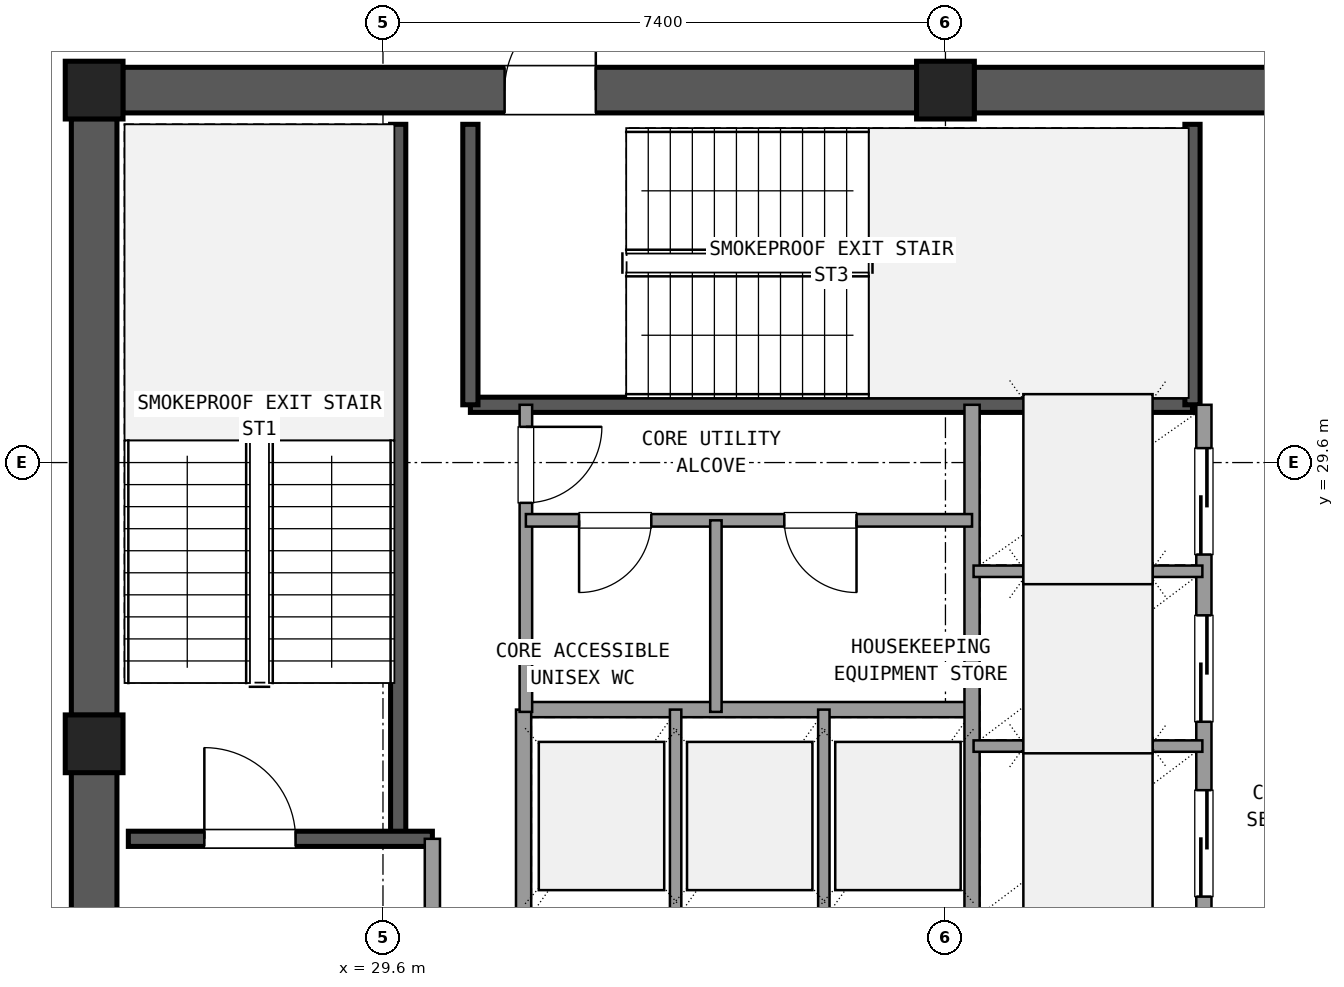
"""IFC4 building model, lengths in metres.
Left out: names, types, materials, properties, quantities, classifications, styles, units other than length and angle.
Written with IfcOpenShell. Run it as: python <this file> out.ifc"""

import sys

from ifc_helpers import new_model, si_unit, direction, frame, frame_2d, origin, origin_2d, place, context, subcontext, project, spatial, rectangle, extrude, element, fill, save


model = new_model("IFC4")
c1 = context("Model", 3, precision=1e-05, world=origin(), true_north=direction((0.0, 1.0)))
c2 = subcontext(c1, "Body", "Model", "MODEL_VIEW")
j1 = project(units=[si_unit("LENGTHUNIT", "METRE"), si_unit("PLANEANGLEUNIT", "RADIAN")], contexts=[c1])
p1 = place(None, origin())
s1 = spatial("IfcSite", under=j1, at=p1, CompositionType="ELEMENT")
p2 = place(p1, origin())
s2 = spatial("IfcBuilding", under=s1, at=p2, CompositionType="ELEMENT")
p3 = place(p2, frame((0.0, 0.0, 290.34)))
s3 = spatial("IfcBuildingStorey", under=s2, at=p3, CompositionType="ELEMENT", Elevation=290.34)
for number, where, z_axis, x_axis in (
    (1, (37.0, 34.5, 0.0), (0.0, 0.0, 1.0), (1.0, 0.0, 0.0)),
    (2, (25.8, 34.5, 0.0), (0.0, 0.0, 1.0), (1.0, 0.0, 0.0)),
    (3, (25.8, 25.9, 0.0), (0.0, 0.0, 1.0), (1.0, 0.0, 0.0)),
):
    element("IfcColumn", number, at=place(p3, frame(where, z_axis=z_axis, x_axis=x_axis)), inside=s3, PredefinedType="COLUMN", context=c2, shape_type="SweptSolid", body=[
        extrude(rectangle(XDim=0.76, YDim=0.76, at=origin_2d()), origin(), (0.0, 0.0, 1.0), 4.32),
    ])
p4 = place(p3, frame((47.825, 34.5, 0.0), z_axis=(0.0, 0.0, 1.0), x_axis=(-1.0, 0.0, 0.0)))
e4 = element("IfcWall", 4, at=p4, inside=s3, PredefinedType="SHEAR", context=c2, shape_type="SweptSolid", body=[
    extrude(rectangle(XDim=10.45, YDim=0.6, at=frame_2d((5.225, 0.0))), origin(), (0.0, 0.0, 1.0), 4.02),
])
p5 = place(p4, frame((4.725, 0.0, 0.0)))
e5 = element("IfcOpeningElement", 5, at=p5, cuts=e4, PredefinedType="OPENING", context=c2, shape_type="SweptSolid", body=[
    extrude(rectangle(XDim=1.6, YDim=2.2, at=frame_2d((0.8, 1.1))), frame((0.0, 0.31, 0.0), z_axis=(0.0, -1.0, 0.0), x_axis=(1.0, 0.0, 0.0)), (0.0, 0.0, 1.0), 0.62),
])
p6 = place(p3, frame((36.625, 34.5, 0.0), z_axis=(0.0, 0.0, 1.0), x_axis=(-1.0, 0.0, 0.0)))
e6 = element("IfcWall", 6, at=p6, inside=s3, PredefinedType="SHEAR", context=c2, shape_type="SweptSolid", body=[
    extrude(rectangle(XDim=10.45, YDim=0.6, at=frame_2d((5.225, 0.0))), origin(), (0.0, 0.0, 1.0), 4.02),
])
p7 = place(p6, frame((4.225, 0.0, 0.0)))
e7 = element("IfcOpeningElement", 7, at=p7, cuts=e6, PredefinedType="OPENING", context=c2, shape_type="SweptSolid", body=[
    extrude(rectangle(XDim=1.2, YDim=2.15, at=frame_2d((0.6, 1.075))), frame((0.0, 0.31, 0.0), z_axis=(0.0, -1.0, 0.0), x_axis=(1.0, 0.0, 0.0)), (0.0, 0.0, 1.0), 0.62),
])
p8 = place(p3, frame((25.8, 34.125, 0.0), z_axis=(0.0, 0.0, 1.0), x_axis=(0.0, -1.0, 0.0)))
e8 = element("IfcWall", 8, at=p8, inside=s3, PredefinedType="SHEAR", context=c2, shape_type="SweptSolid", body=[
    extrude(rectangle(XDim=7.85, YDim=0.6, at=frame_2d((3.925, 0.0))), origin(), (0.0, 0.0, 1.0), 4.02),
])
p9 = place(p3, frame((25.8, 25.525, 0.0), z_axis=(0.0, 0.0, 1.0), x_axis=(0.0, -1.0, 0.0)))
e9 = element("IfcWall", 9, at=p9, inside=s3, PredefinedType="SHEAR", context=c2, shape_type="SweptSolid", body=[
    extrude(rectangle(XDim=7.85, YDim=0.6, at=frame_2d((3.925, 0.0))), origin(), (0.0, 0.0, 1.0), 4.02),
])
p10 = place(p9, frame((2.275, 0.0, 0.0)))
e10 = element("IfcOpeningElement", 10, at=p10, cuts=e9, PredefinedType="OPENING", context=c2, shape_type="SweptSolid", body=[
    extrude(rectangle(XDim=1.2, YDim=2.15, at=frame_2d((0.6, 1.075))), frame((0.0, 0.31, 0.0), z_axis=(0.0, -1.0, 0.0), x_axis=(1.0, 0.0, 0.0)), (0.0, 0.0, 1.0), 0.62),
])
p11 = place(p3, frame((29.8, 24.65, 0.0), z_axis=(0.0, 0.0, 1.0), x_axis=(0.0, 1.0, 0.0)))
e11 = element("IfcWall", 11, at=p11, inside=s3, PredefinedType="SHEAR", context=c2, shape_type="SweptSolid", body=[
    extrude(rectangle(XDim=9.4, YDim=0.2, at=frame_2d((4.7, 0.0))), origin(), (0.0, 0.0, 1.0), 4.02),
])
p12 = place(p3, frame((26.25, 24.65, 0.0), z_axis=(0.0, 0.0, 1.0), x_axis=(1.0, 0.0, 0.0)))
e12 = element("IfcWall", 12, at=p12, inside=s3, PredefinedType="SHEAR", context=c2, shape_type="SweptSolid", body=[
    extrude(rectangle(XDim=4.0, YDim=0.2, at=frame_2d((2.0, 0.0))), origin(), (0.0, 0.0, 1.0), 4.02),
])
p13 = place(p12, frame((1.0, 0.0, 0.0)))
e13 = element("IfcOpeningElement", 13, at=p13, cuts=e12, PredefinedType="OPENING", context=c2, shape_type="SweptSolid", body=[
    extrude(rectangle(XDim=1.2, YDim=2.15, at=frame_2d((0.6, 1.075))), frame((0.0, 0.11, 0.0), z_axis=(0.0, -1.0, 0.0), x_axis=(1.0, 0.0, 0.0)), (0.0, 0.0, 1.0), 0.22),
])
p14 = place(p3, frame((30.75, 30.36, 0.0), z_axis=(0.0, 0.0, 1.0), x_axis=(1.0, 0.0, 0.0)))
e14 = element("IfcWall", 14, at=p14, inside=s3, PredefinedType="SHEAR", context=c2, shape_type="SweptSolid", body=[
    extrude(rectangle(XDim=9.5, YDim=0.2, at=frame_2d((4.75, 0.0))), origin(), (0.0, 0.0, 1.0), 4.02),
])
for number, where, z_axis, x_axis in (
    (15, (30.75, 30.36, 0.0), (0.0, 0.0, 1.0), (0.0, 1.0, 0.0)),
    (16, (40.25, 30.36, 0.0), (0.0, 0.0, 1.0), (0.0, 1.0, 0.0)),
):
    element("IfcWall", number, at=place(p3, frame(where, z_axis=z_axis, x_axis=x_axis)), inside=s3, PredefinedType="SHEAR", context=c2, shape_type="SweptSolid", body=[
        extrude(rectangle(XDim=3.69, YDim=0.2, at=frame_2d((1.845, 0.0))), origin(), (0.0, 0.0, 1.0), 4.02),
    ])
p15 = place(p3, frame((30.25, 17.75, 0.0), z_axis=(0.0, 0.0, 1.0), x_axis=(0.0, 1.0, 0.0)))
e17 = element("IfcWall", 17, at=p15, inside=s3, PredefinedType="SOLIDWALL", context=c2, shape_type="SweptSolid", body=[
    extrude(rectangle(XDim=6.9, YDim=0.2, at=frame_2d((3.45, 0.0))), origin(), (0.0, 0.0, 1.0), 2.93),
])
p16 = place(p15, frame((4.15, 0.0, 0.0)))
e18 = element("IfcOpeningElement", 18, at=p16, cuts=e17, PredefinedType="OPENING", context=c2, shape_type="SweptSolid", body=[
    extrude(rectangle(XDim=1.2, YDim=2.15, at=frame_2d((0.6, 1.075))), frame((0.0, 0.11, 0.0), z_axis=(0.0, -1.0, 0.0), x_axis=(1.0, 0.0, 0.0)), (0.0, 0.0, 1.0), 0.22),
])
p17 = place(p3, frame((31.45, 26.35, 0.0), z_axis=(0.0, 0.0, 1.0), x_axis=(1.0, 0.0, 0.0)))
e19 = element("IfcWall", 19, at=p17, inside=s3, PredefinedType="SOLIDWALL", context=c2, shape_type="SweptSolid", body=[
    extrude(rectangle(XDim=5.9, YDim=0.2, at=frame_2d((2.95, 0.0))), origin(), (0.0, 0.0, 1.0), 2.93),
])
p18 = place(p3, frame((31.45, 23.54, 0.0), z_axis=(0.0, 0.0, 1.0), x_axis=(0.0, 1.0, 0.0)))
e20 = element("IfcWall", 20, at=p18, inside=s3, PredefinedType="SOLIDWALL", context=c2, shape_type="SweptSolid", body=[
    extrude(rectangle(XDim=2.81, YDim=0.2, at=frame_2d((1.405, 0.0))), origin(), (0.0, 0.0, 1.0), 2.93),
])
for number, where, z_axis, x_axis in (
    (21, (33.45, 23.54, 0.0), (0.0, 0.0, 1.0), (0.0, 1.0, 0.0)),
    (22, (35.4, 23.54, 0.0), (0.0, 0.0, 1.0), (0.0, 1.0, 0.0)),
):
    element("IfcWall", number, at=place(p3, frame(where, z_axis=z_axis, x_axis=x_axis)), inside=s3, PredefinedType="PARTITIONING", context=c2, shape_type="SweptSolid", body=[
        extrude(rectangle(XDim=2.81, YDim=0.15, at=frame_2d((1.405, 0.0))), origin(), (0.0, 0.0, 1.0), 2.93),
    ])
p19 = place(p3, frame((37.35, 23.54, 0.0), z_axis=(0.0, 0.0, 1.0), x_axis=(0.0, 1.0, 0.0)))
e23 = element("IfcWall", 23, at=p19, inside=s3, PredefinedType="SOLIDWALL", context=c2, shape_type="SweptSolid", body=[
    extrude(rectangle(XDim=6.82, YDim=0.2, at=frame_2d((3.41, 0.0))), origin(), (0.0, 0.0, 1.0), 2.93),
])
p20 = place(p3, frame((40.4, 23.54, 0.0), z_axis=(0.0, 0.0, 1.0), x_axis=(0.0, 1.0, 0.0)))
e24 = element("IfcWall", 24, at=p20, inside=s3, PredefinedType="SOLIDWALL", context=c2, shape_type="SweptSolid", body=[
    extrude(rectangle(XDim=6.82, YDim=0.2, at=frame_2d((3.41, 0.0))), origin(), (0.0, 0.0, 1.0), 2.93),
])
p21 = place(p20, frame((0.35, 0.0, 0.0)))
e25 = element("IfcOpeningElement", 25, at=p21, cuts=e24, PredefinedType="OPENING", context=c2, shape_type="SweptSolid", body=[
    extrude(rectangle(XDim=1.4, YDim=2.2, at=frame_2d((0.7, 1.1))), frame((0.0, 0.11, 0.0), z_axis=(0.0, -1.0, 0.0), x_axis=(1.0, 0.0, 0.0)), (0.0, 0.0, 1.0), 0.22),
])
p22 = place(p20, frame((2.65, 0.0, 0.0)))
e26 = element("IfcOpeningElement", 26, at=p22, cuts=e24, PredefinedType="OPENING", context=c2, shape_type="SweptSolid", body=[
    extrude(rectangle(XDim=1.4, YDim=2.2, at=frame_2d((0.7, 1.1))), frame((0.0, 0.11, 0.0), z_axis=(0.0, -1.0, 0.0), x_axis=(1.0, 0.0, 0.0)), (0.0, 0.0, 1.0), 0.22),
])
p23 = place(p20, frame((4.85, 0.0, 0.0)))
e27 = element("IfcOpeningElement", 27, at=p23, cuts=e24, PredefinedType="OPENING", context=c2, shape_type="SweptSolid", body=[
    extrude(rectangle(XDim=1.4, YDim=2.2, at=frame_2d((0.7, 1.1))), frame((0.0, 0.11, 0.0), z_axis=(0.0, -1.0, 0.0), x_axis=(1.0, 0.0, 0.0)), (0.0, 0.0, 1.0), 0.22),
])
for number, where, z_axis, x_axis in (
    (28, (37.37, 25.87, 0.0), (0.0, 0.0, 1.0), (1.0, 0.0, 0.0)),
    (29, (37.37, 28.17, 0.0), (0.0, 0.0, 1.0), (1.0, 0.0, 0.0)),
):
    element("IfcWall", number, at=place(p3, frame(where, z_axis=z_axis, x_axis=x_axis)), inside=s3, PredefinedType="PARTITIONING", context=c2, shape_type="SweptSolid", body=[
        extrude(rectangle(XDim=3.01, YDim=0.15, at=frame_2d((1.505, 0.0))), origin(), (0.0, 0.0, 1.0), 2.93),
    ])
p24 = place(p3, frame((31.48, 26.32, 0.0), z_axis=(0.0, 0.0, 1.0), x_axis=(0.0, 1.0, 0.0)))
e30 = element("IfcWall", 30, at=p24, inside=s3, PredefinedType="PLUMBINGWALL", context=c2, shape_type="SweptSolid", body=[
    extrude(rectangle(XDim=4.04, YDim=0.165, at=frame_2d((2.02, 0.0))), origin(), (0.0, 0.0, 1.0), 2.93),
])
p25 = place(p24, frame((2.75, 0.0, 0.0)))
e31 = element("IfcOpeningElement", 31, at=p25, cuts=e30, PredefinedType="OPENING", context=c2, shape_type="SweptSolid", body=[
    extrude(rectangle(XDim=1.0, YDim=2.15, at=frame_2d((0.5, 1.075))), frame((0.0, 0.093, 0.0), z_axis=(0.0, -1.0, 0.0), x_axis=(1.0, 0.0, 0.0)), (0.0, 0.0, 1.0), 0.185),
])
p26 = place(p3, frame((31.48, 28.84, 0.0), z_axis=(0.0, 0.0, 1.0), x_axis=(1.0, 0.0, 0.0)))
e32 = element("IfcWall", 32, at=p26, inside=s3, PredefinedType="PLUMBINGWALL", context=c2, shape_type="SweptSolid", body=[
    extrude(rectangle(XDim=5.87, YDim=0.165, at=frame_2d((2.935, 0.0))), origin(), (0.0, 0.0, 1.0), 2.93),
])
p27 = place(p26, frame((0.7, 0.0, 0.0)))
e33 = element("IfcOpeningElement", 33, at=p27, cuts=e32, PredefinedType="OPENING", context=c2, shape_type="SweptSolid", body=[
    extrude(rectangle(XDim=0.95, YDim=2.1, at=frame_2d((0.475, 1.05))), frame((0.0, 0.093, 0.0), z_axis=(0.0, -1.0, 0.0), x_axis=(1.0, 0.0, 0.0)), (0.0, 0.0, 1.0), 0.185),
])
p28 = place(p26, frame((3.4, 0.0, 0.0)))
e34 = element("IfcOpeningElement", 34, at=p28, cuts=e32, PredefinedType="OPENING", context=c2, shape_type="SweptSolid", body=[
    extrude(rectangle(XDim=0.95, YDim=2.1, at=frame_2d((0.475, 1.05))), frame((0.0, 0.093, 0.0), z_axis=(0.0, -1.0, 0.0), x_axis=(1.0, 0.0, 0.0)), (0.0, 0.0, 1.0), 0.185),
])
p29 = place(p3, frame((33.98, 26.32, 0.0), z_axis=(0.0, 0.0, 1.0), x_axis=(0.0, 1.0, 0.0)))
e35 = element("IfcWall", 35, at=p29, inside=s3, PredefinedType="PARTITIONING", context=c2, shape_type="SweptSolid", body=[
    extrude(rectangle(XDim=2.52, YDim=0.15, at=frame_2d((1.26, 0.0))), origin(), (0.0, 0.0, 1.0), 2.93),
])
p30 = place(p13, origin())
e36 = element("IfcDoor", 36, at=p30, inside=s3, OperationType="SINGLE_SWING_LEFT", PredefinedType="DOOR", context=c2, shape_type="SweptSolid", body=[
    extrude(rectangle(XDim=1.2, YDim=2.15, at=frame_2d((0.6, 1.075))), frame((0.0, 0.025, 0.0), z_axis=(0.0, -1.0, 0.0), x_axis=(1.0, 0.0, 0.0)), (0.0, 0.0, 1.0), 0.05),
])
fill(e13, e36)
p31 = place(p7, frame((1.2, 0.0, 0.0), z_axis=(0.0, 0.0, 1.0), x_axis=(-1.0, 0.0, 0.0)))
e37 = element("IfcDoor", 37, at=p31, inside=s3, OperationType="SINGLE_SWING_LEFT", PredefinedType="DOOR", context=c2, shape_type="SweptSolid", body=[
    extrude(rectangle(XDim=1.2, YDim=2.15, at=frame_2d((0.6, 1.075))), frame((0.0, 0.025, 0.0), z_axis=(0.0, -1.0, 0.0), x_axis=(1.0, 0.0, 0.0)), (0.0, 0.0, 1.0), 0.05),
])
fill(e7, e37)
p32 = place(p21, origin())
e38 = element("IfcDoor", 38, at=p32, inside=s3, OperationType="SLIDING_TO_LEFT", PredefinedType="DOOR", context=c2, shape_type="SweptSolid", body=[
    extrude(rectangle(XDim=1.4, YDim=2.2, at=frame_2d((0.7, 1.1))), frame((0.0, 0.025, 0.0), z_axis=(0.0, -1.0, 0.0), x_axis=(1.0, 0.0, 0.0)), (0.0, 0.0, 1.0), 0.05),
])
fill(e25, e38)
p33 = place(p22, origin())
e39 = element("IfcDoor", 39, at=p33, inside=s3, OperationType="SLIDING_TO_LEFT", PredefinedType="DOOR", context=c2, shape_type="SweptSolid", body=[
    extrude(rectangle(XDim=1.4, YDim=2.2, at=frame_2d((0.7, 1.1))), frame((0.0, 0.025, 0.0), z_axis=(0.0, -1.0, 0.0), x_axis=(1.0, 0.0, 0.0)), (0.0, 0.0, 1.0), 0.05),
])
fill(e26, e39)
p34 = place(p23, origin())
e40 = element("IfcDoor", 40, at=p34, inside=s3, OperationType="SLIDING_TO_RIGHT", PredefinedType="DOOR", context=c2, shape_type="SweptSolid", body=[
    extrude(rectangle(XDim=1.4, YDim=2.2, at=frame_2d((0.7, 1.1))), frame((0.0, 0.025, 0.0), z_axis=(0.0, -1.0, 0.0), x_axis=(1.0, 0.0, 0.0)), (0.0, 0.0, 1.0), 0.05),
])
fill(e27, e40)
p35 = place(p25, frame((1.0, 0.0, 0.0), z_axis=(0.0, 0.0, 1.0), x_axis=(-1.0, 0.0, 0.0)))
e41 = element("IfcDoor", 41, at=p35, inside=s3, OperationType="SINGLE_SWING_RIGHT", PredefinedType="DOOR", context=c2, shape_type="SweptSolid", body=[
    extrude(rectangle(XDim=1.0, YDim=2.15, at=frame_2d((0.5, 1.075))), frame((0.0, 0.025, 0.0), z_axis=(0.0, -1.0, 0.0), x_axis=(1.0, 0.0, 0.0)), (0.0, 0.0, 1.0), 0.05),
])
fill(e31, e41)
p36 = place(p27, frame((0.95, 0.0, 0.0), z_axis=(0.0, 0.0, 1.0), x_axis=(-1.0, 0.0, 0.0)))
e42 = element("IfcDoor", 42, at=p36, inside=s3, OperationType="SINGLE_SWING_LEFT", PredefinedType="DOOR", context=c2, shape_type="SweptSolid", body=[
    extrude(rectangle(XDim=0.95, YDim=2.1, at=frame_2d((0.475, 1.05))), frame((0.0, 0.025, 0.0), z_axis=(0.0, -1.0, 0.0), x_axis=(1.0, 0.0, 0.0)), (0.0, 0.0, 1.0), 0.05),
])
fill(e33, e42)
p37 = place(p28, frame((0.95, 0.0, 0.0), z_axis=(0.0, 0.0, 1.0), x_axis=(-1.0, 0.0, 0.0)))
e43 = element("IfcDoor", 43, at=p37, inside=s3, OperationType="SINGLE_SWING_RIGHT", PredefinedType="DOOR", context=c2, shape_type="SweptSolid", body=[
    extrude(rectangle(XDim=0.95, YDim=2.1, at=frame_2d((0.475, 1.05))), frame((0.0, 0.025, 0.0), z_axis=(0.0, -1.0, 0.0), x_axis=(1.0, 0.0, 0.0)), (0.0, 0.0, 1.0), 0.05),
])
fill(e34, e43)
save(model, sys.argv[1])
